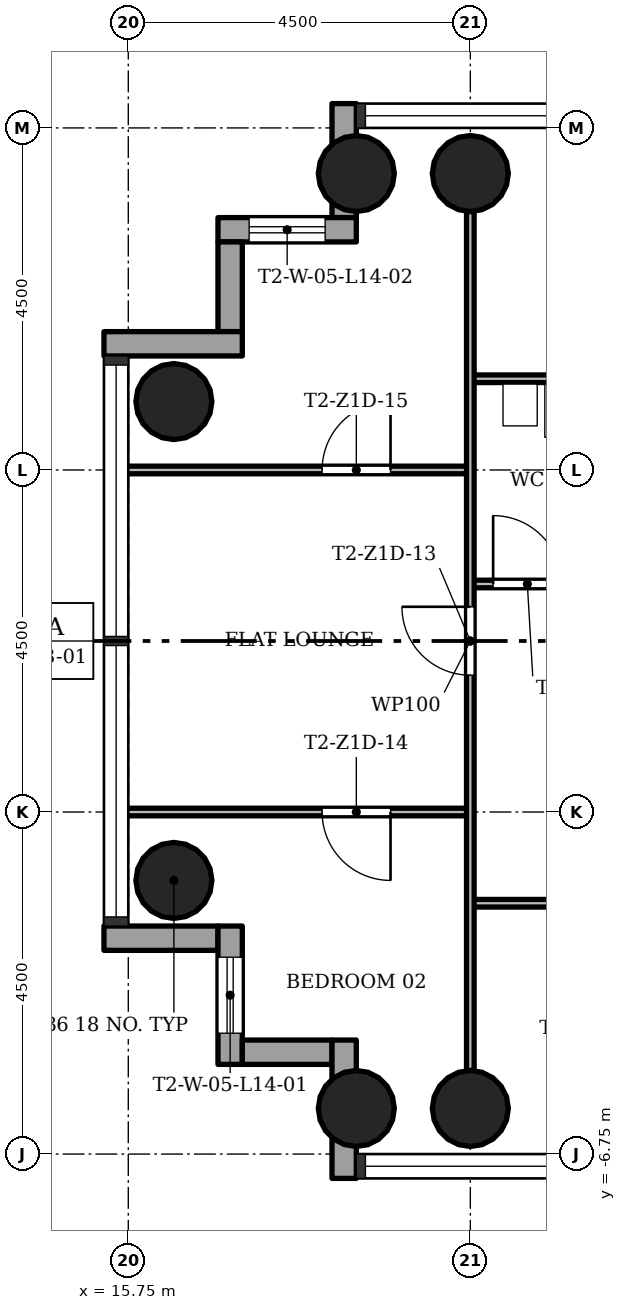
"""IFC4 building model, lengths in metres.
Left out: names, types, materials, properties, quantities, classifications, styles, units other than length and angle.
Written with IfcOpenShell. Run it as: python <this file> out.ifc"""

import sys

from ifc_helpers import new_model, si_unit, direction, frame, frame_2d, origin, origin_2d, place, context, subcontext, project, spatial, rectangle, hollow_circle, extrude, element, fill, save


model = new_model("IFC4")
c1 = context("Model", 3, precision=1e-05, world=origin(), true_north=direction((0.0, 1.0)))
c2 = subcontext(c1, "Body", "Model", "MODEL_VIEW")
j1 = project(units=[si_unit("LENGTHUNIT", "METRE"), si_unit("PLANEANGLEUNIT", "RADIAN")], contexts=[c1])
p1 = place(None, origin())
s1 = spatial("IfcSite", under=j1, at=p1, CompositionType="ELEMENT")
p2 = place(p1, origin())
s2 = spatial("IfcBuilding", under=s1, at=p2, CompositionType="ELEMENT")
p3 = place(p2, frame((0.0, 0.0, 55.1)))
s3 = spatial("IfcBuildingStorey", under=s2, at=p3, CompositionType="ELEMENT", Elevation=55.1)
for number, where, z_axis, x_axis in (
    (1, (20.25, 6.15, 0.0), (0.0, 0.0, 1.0), (1.0, 0.0, 0.0)),
    (2, (20.25, -6.15, 0.0), (0.0, 0.0, 1.0), (1.0, 0.0, 0.0)),
    (3, (18.75, 6.15, 0.0), (0.0, 0.0, 1.0), (1.0, 0.0, 0.0)),
    (4, (18.75, -6.15, 0.0), (0.0, 0.0, 1.0), (1.0, 0.0, 0.0)),
    (5, (16.35, 3.15, 0.0), (0.0, 0.0, 1.0), (1.0, 0.0, 0.0)),
    (6, (16.35, -3.15, 0.0), (0.0, 0.0, 1.0), (1.0, 0.0, 0.0)),
):
    element("IfcColumn", number, at=place(p3, frame(where, z_axis=z_axis, x_axis=x_axis)), inside=s3, PredefinedType="COLUMN", context=c2, shape_type="SweptSolid", body=[
        extrude(hollow_circle(Radius=0.5, WallThickness=0.036, at=origin_2d()), origin(), (0.0, 0.0, 1.0), 3.4),
    ])
p4 = place(p3, frame((18.59, 7.07, -0.3), z_axis=(0.0, 0.0, 1.0), x_axis=(0.0, -1.0, 0.0)))
e7 = element("IfcWall", 7, at=p4, inside=s3, PredefinedType="STANDARD", context=c2, shape_type="SweptSolid", body=[
    extrude(rectangle(XDim=1.5, YDim=0.32, at=frame_2d((0.75, 0.0))), origin(), (0.0, 0.0, 1.0), 3.4),
])
p5 = place(p3, frame((18.75, 5.41, -0.3), z_axis=(0.0, 0.0, 1.0), x_axis=(-1.0, 0.0, 0.0)))
e8 = element("IfcWall", 8, at=p5, inside=s3, PredefinedType="STANDARD", context=c2, shape_type="SweptSolid", body=[
    extrude(rectangle(XDim=1.82, YDim=0.32, at=frame_2d((0.91, 0.0))), origin(), (0.0, 0.0, 1.0), 3.4),
])
p6 = place(p5, frame((0.41, 0.0, 1.2)))
e9 = element("IfcOpeningElement", 9, at=p6, cuts=e8, PredefinedType="OPENING", context=c2, shape_type="SweptSolid", body=[
    extrude(rectangle(XDim=1.0, YDim=1.5, at=frame_2d((0.5, 0.75))), frame((0.0, 0.17, 0.0), z_axis=(0.0, -1.0, 0.0), x_axis=(1.0, 0.0, 0.0)), (0.0, 0.0, 1.0), 0.34),
])
p7 = place(p3, frame((17.09, 5.25, -0.3), z_axis=(0.0, 0.0, 1.0), x_axis=(0.0, -1.0, 0.0)))
e10 = element("IfcWall", 10, at=p7, inside=s3, PredefinedType="STANDARD", context=c2, shape_type="SweptSolid", body=[
    extrude(rectangle(XDim=1.18, YDim=0.32, at=frame_2d((0.59, 0.0))), origin(), (0.0, 0.0, 1.0), 3.4),
])
p8 = place(p3, frame((17.25, 3.91, -0.3), z_axis=(0.0, 0.0, 1.0), x_axis=(-1.0, 0.0, 0.0)))
e11 = element("IfcWall", 11, at=p8, inside=s3, PredefinedType="STANDARD", context=c2, shape_type="SweptSolid", body=[
    extrude(rectangle(XDim=1.82, YDim=0.32, at=frame_2d((0.91, 0.0))), origin(), (0.0, 0.0, 1.0), 3.4),
])
p9 = place(p3, frame((15.43, -3.91, -0.3), z_axis=(0.0, 0.0, 1.0), x_axis=(1.0, 0.0, 0.0)))
e12 = element("IfcWall", 12, at=p9, inside=s3, PredefinedType="STANDARD", context=c2, shape_type="SweptSolid", body=[
    extrude(rectangle(XDim=1.5, YDim=0.32, at=frame_2d((0.75, 0.0))), origin(), (0.0, 0.0, 1.0), 3.4),
])
p10 = place(p3, frame((17.09, -3.75, -0.3), z_axis=(0.0, 0.0, 1.0), x_axis=(0.0, -1.0, 0.0)))
e13 = element("IfcWall", 13, at=p10, inside=s3, PredefinedType="STANDARD", context=c2, shape_type="SweptSolid", body=[
    extrude(rectangle(XDim=1.82, YDim=0.32, at=frame_2d((0.91, 0.0))), origin(), (0.0, 0.0, 1.0), 3.4),
])
p11 = place(p10, frame((0.41, 0.0, 1.2)))
e14 = element("IfcOpeningElement", 14, at=p11, cuts=e13, PredefinedType="OPENING", context=c2, shape_type="SweptSolid", body=[
    extrude(rectangle(XDim=1.0, YDim=1.5, at=frame_2d((0.5, 0.75))), frame((0.0, 0.17, 0.0), z_axis=(0.0, -1.0, 0.0), x_axis=(1.0, 0.0, 0.0)), (0.0, 0.0, 1.0), 0.34),
])
p12 = place(p3, frame((17.25, -5.41, -0.3), z_axis=(0.0, 0.0, 1.0), x_axis=(1.0, 0.0, 0.0)))
e15 = element("IfcWall", 15, at=p12, inside=s3, PredefinedType="STANDARD", context=c2, shape_type="SweptSolid", body=[
    extrude(rectangle(XDim=1.18, YDim=0.32, at=frame_2d((0.59, 0.0))), origin(), (0.0, 0.0, 1.0), 3.4),
])
p13 = place(p3, frame((18.59, -5.25, -0.3), z_axis=(0.0, 0.0, 1.0), x_axis=(0.0, -1.0, 0.0)))
e16 = element("IfcWall", 16, at=p13, inside=s3, PredefinedType="STANDARD", context=c2, shape_type="SweptSolid", body=[
    extrude(rectangle(XDim=1.82, YDim=0.32, at=frame_2d((0.91, 0.0))), origin(), (0.0, 0.0, 1.0), 3.4),
])
p14 = place(p3, frame((24.75, -3.45, 0.0), z_axis=(0.0, 0.0, 1.0), x_axis=(-1.0, 0.0, 0.0)))
e17 = element("IfcWall", 17, at=p14, inside=s3, PredefinedType="PARTITIONING", context=c2, shape_type="SweptSolid", body=[
    extrude(rectangle(XDim=4.5, YDim=0.1, at=frame_2d((2.25, 0.0))), origin(), (0.0, 0.0, 1.0), 3.0),
])
p15 = place(p14, frame((0.15, 0.0, 0.0)))
e18 = element("IfcOpeningElement", 18, at=p15, cuts=e17, PredefinedType="OPENING", context=c2, shape_type="SweptSolid", body=[
    extrude(rectangle(XDim=0.9, YDim=2.1, at=frame_2d((0.45, 1.05))), frame((0.0, 0.06, 0.0), z_axis=(0.0, -1.0, 0.0), x_axis=(1.0, 0.0, 0.0)), (0.0, 0.0, 1.0), 0.12),
])
p16 = place(p3, frame((20.25, -2.25, 0.0), z_axis=(0.0, 0.0, 1.0), x_axis=(-1.0, 0.0, 0.0)))
e19 = element("IfcWall", 19, at=p16, inside=s3, PredefinedType="PARTITIONING", context=c2, shape_type="SweptSolid", body=[
    extrude(rectangle(XDim=4.6, YDim=0.1, at=frame_2d((2.3, 0.0))), origin(), (0.0, 0.0, 1.0), 3.0),
])
p17 = place(p16, frame((1.05, 0.0, 0.0)))
e20 = element("IfcOpeningElement", 20, at=p17, cuts=e19, PredefinedType="OPENING", context=c2, shape_type="SweptSolid", body=[
    extrude(rectangle(XDim=0.9, YDim=2.1, at=frame_2d((0.45, 1.05))), frame((0.0, 0.06, 0.0), z_axis=(0.0, -1.0, 0.0), x_axis=(1.0, 0.0, 0.0)), (0.0, 0.0, 1.0), 0.12),
])
p18 = place(p3, frame((23.55, 0.75, 0.0), z_axis=(0.0, 0.0, 1.0), x_axis=(-1.0, 0.0, 0.0)))
e21 = element("IfcWall", 21, at=p18, inside=s3, PredefinedType="PARTITIONING", context=c2, shape_type="SweptSolid", body=[
    extrude(rectangle(XDim=3.3, YDim=0.1, at=frame_2d((1.65, 0.0))), origin(), (0.0, 0.0, 1.0), 3.0),
])
p19 = place(p18, frame((0.45, 0.0, 0.0)))
e22 = element("IfcOpeningElement", 22, at=p19, cuts=e21, PredefinedType="OPENING", context=c2, shape_type="SweptSolid", body=[
    extrude(rectangle(XDim=0.9, YDim=2.1, at=frame_2d((0.45, 1.05))), frame((0.0, 0.06, 0.0), z_axis=(0.0, -1.0, 0.0), x_axis=(1.0, 0.0, 0.0)), (0.0, 0.0, 1.0), 0.12),
])
p20 = place(p18, frame((2.1, 0.0, 0.0)))
e23 = element("IfcOpeningElement", 23, at=p20, cuts=e21, PredefinedType="OPENING", context=c2, shape_type="SweptSolid", body=[
    extrude(rectangle(XDim=0.9, YDim=2.1, at=frame_2d((0.45, 1.05))), frame((0.0, 0.06, 0.0), z_axis=(0.0, -1.0, 0.0), x_axis=(1.0, 0.0, 0.0)), (0.0, 0.0, 1.0), 0.12),
])
p21 = place(p3, frame((20.25, 2.25, 0.0), z_axis=(0.0, 0.0, 1.0), x_axis=(-1.0, 0.0, 0.0)))
e24 = element("IfcWall", 24, at=p21, inside=s3, PredefinedType="PARTITIONING", context=c2, shape_type="SweptSolid", body=[
    extrude(rectangle(XDim=4.6, YDim=0.1, at=frame_2d((2.3, 0.0))), origin(), (0.0, 0.0, 1.0), 3.0),
])
p22 = place(p21, frame((1.05, 0.0, 0.0)))
e25 = element("IfcOpeningElement", 25, at=p22, cuts=e24, PredefinedType="OPENING", context=c2, shape_type="SweptSolid", body=[
    extrude(rectangle(XDim=0.9, YDim=2.1, at=frame_2d((0.45, 1.05))), frame((0.0, 0.06, 0.0), z_axis=(0.0, -1.0, 0.0), x_axis=(1.0, 0.0, 0.0)), (0.0, 0.0, 1.0), 0.12),
])
p23 = place(p3, frame((24.75, 3.45, 0.0), z_axis=(0.0, 0.0, 1.0), x_axis=(-1.0, 0.0, 0.0)))
e26 = element("IfcWall", 26, at=p23, inside=s3, PredefinedType="PARTITIONING", context=c2, shape_type="SweptSolid", body=[
    extrude(rectangle(XDim=4.5, YDim=0.1, at=frame_2d((2.25, 0.0))), origin(), (0.0, 0.0, 1.0), 3.0),
])
p24 = place(p23, frame((0.15, 0.0, 0.0)))
e27 = element("IfcOpeningElement", 27, at=p24, cuts=e26, PredefinedType="OPENING", context=c2, shape_type="SweptSolid", body=[
    extrude(rectangle(XDim=0.9, YDim=2.1, at=frame_2d((0.45, 1.05))), frame((0.0, 0.06, 0.0), z_axis=(0.0, -1.0, 0.0), x_axis=(1.0, 0.0, 0.0)), (0.0, 0.0, 1.0), 0.12),
])
p25 = place(p3, frame((20.25, -5.65, 0.0), z_axis=(0.0, 0.0, 1.0), x_axis=(0.0, 1.0, 0.0)))
e28 = element("IfcWall", 28, at=p25, inside=s3, PredefinedType="PARTITIONING", context=c2, shape_type="SweptSolid", body=[
    extrude(rectangle(XDim=11.3, YDim=0.1, at=frame_2d((5.65, 0.0))), origin(), (0.0, 0.0, 1.0), 3.0),
])
p26 = place(p25, frame((5.2, 0.0, 0.0)))
e29 = element("IfcOpeningElement", 29, at=p26, cuts=e28, PredefinedType="OPENING", context=c2, shape_type="SweptSolid", body=[
    extrude(rectangle(XDim=0.9, YDim=2.1, at=frame_2d((0.45, 1.05))), frame((0.0, 0.06, 0.0), z_axis=(0.0, -1.0, 0.0), x_axis=(1.0, 0.0, 0.0)), (0.0, 0.0, 1.0), 0.12),
])
p27 = place(p20, origin())
e30 = element("IfcDoor", 30, at=p27, inside=s3, OperationType="SINGLE_SWING_RIGHT", PredefinedType="DOOR", context=c2, shape_type="SweptSolid", body=[
    extrude(rectangle(XDim=0.9, YDim=2.1, at=frame_2d((0.45, 1.05))), frame((0.0, 0.025, 0.0), z_axis=(0.0, -1.0, 0.0), x_axis=(1.0, 0.0, 0.0)), (0.0, 0.0, 1.0), 0.05),
])
fill(e23, e30)
p28 = place(p26, origin())
e31 = element("IfcDoor", 31, at=p28, inside=s3, OperationType="SINGLE_SWING_LEFT", PredefinedType="DOOR", context=c2, shape_type="SweptSolid", body=[
    extrude(rectangle(XDim=0.9, YDim=2.1, at=frame_2d((0.45, 1.05))), frame((0.0, 0.025, 0.0), z_axis=(0.0, -1.0, 0.0), x_axis=(1.0, 0.0, 0.0)), (0.0, 0.0, 1.0), 0.05),
])
fill(e29, e31)
p29 = place(p17, origin())
e32 = element("IfcDoor", 32, at=p29, inside=s3, OperationType="SINGLE_SWING_RIGHT", PredefinedType="DOOR", context=c2, shape_type="SweptSolid", body=[
    extrude(rectangle(XDim=0.9, YDim=2.1, at=frame_2d((0.45, 1.05))), frame((0.0, 0.025, 0.0), z_axis=(0.0, -1.0, 0.0), x_axis=(1.0, 0.0, 0.0)), (0.0, 0.0, 1.0), 0.05),
])
fill(e20, e32)
p30 = place(p22, origin())
e33 = element("IfcDoor", 33, at=p30, inside=s3, OperationType="SINGLE_SWING_LEFT", PredefinedType="DOOR", context=c2, shape_type="SweptSolid", body=[
    extrude(rectangle(XDim=0.9, YDim=2.1, at=frame_2d((0.45, 1.05))), frame((0.0, 0.025, 0.0), z_axis=(0.0, -1.0, 0.0), x_axis=(1.0, 0.0, 0.0)), (0.0, 0.0, 1.0), 0.05),
])
fill(e25, e33)
p31 = place(p11, origin())
e34 = element("IfcWindow", 34, at=p31, inside=s3, PartitioningType="SINGLE_PANEL", PredefinedType="WINDOW", context=c2, shape_type="SweptSolid", body=[
    extrude(rectangle(XDim=1.0, YDim=1.5, at=frame_2d((0.5, 0.75))), frame((0.0, 0.03, 0.0), z_axis=(0.0, -1.0, 0.0), x_axis=(1.0, 0.0, 0.0)), (0.0, 0.0, 1.0), 0.06),
])
fill(e14, e34)
p32 = place(p6, origin())
e35 = element("IfcWindow", 35, at=p32, inside=s3, PartitioningType="SINGLE_PANEL", PredefinedType="WINDOW", context=c2, shape_type="SweptSolid", body=[
    extrude(rectangle(XDim=1.0, YDim=1.5, at=frame_2d((0.5, 0.75))), frame((0.0, 0.03, 0.0), z_axis=(0.0, -1.0, 0.0), x_axis=(1.0, 0.0, 0.0)), (0.0, 0.0, 1.0), 0.06),
])
fill(e9, e35)
save(model, sys.argv[1])
